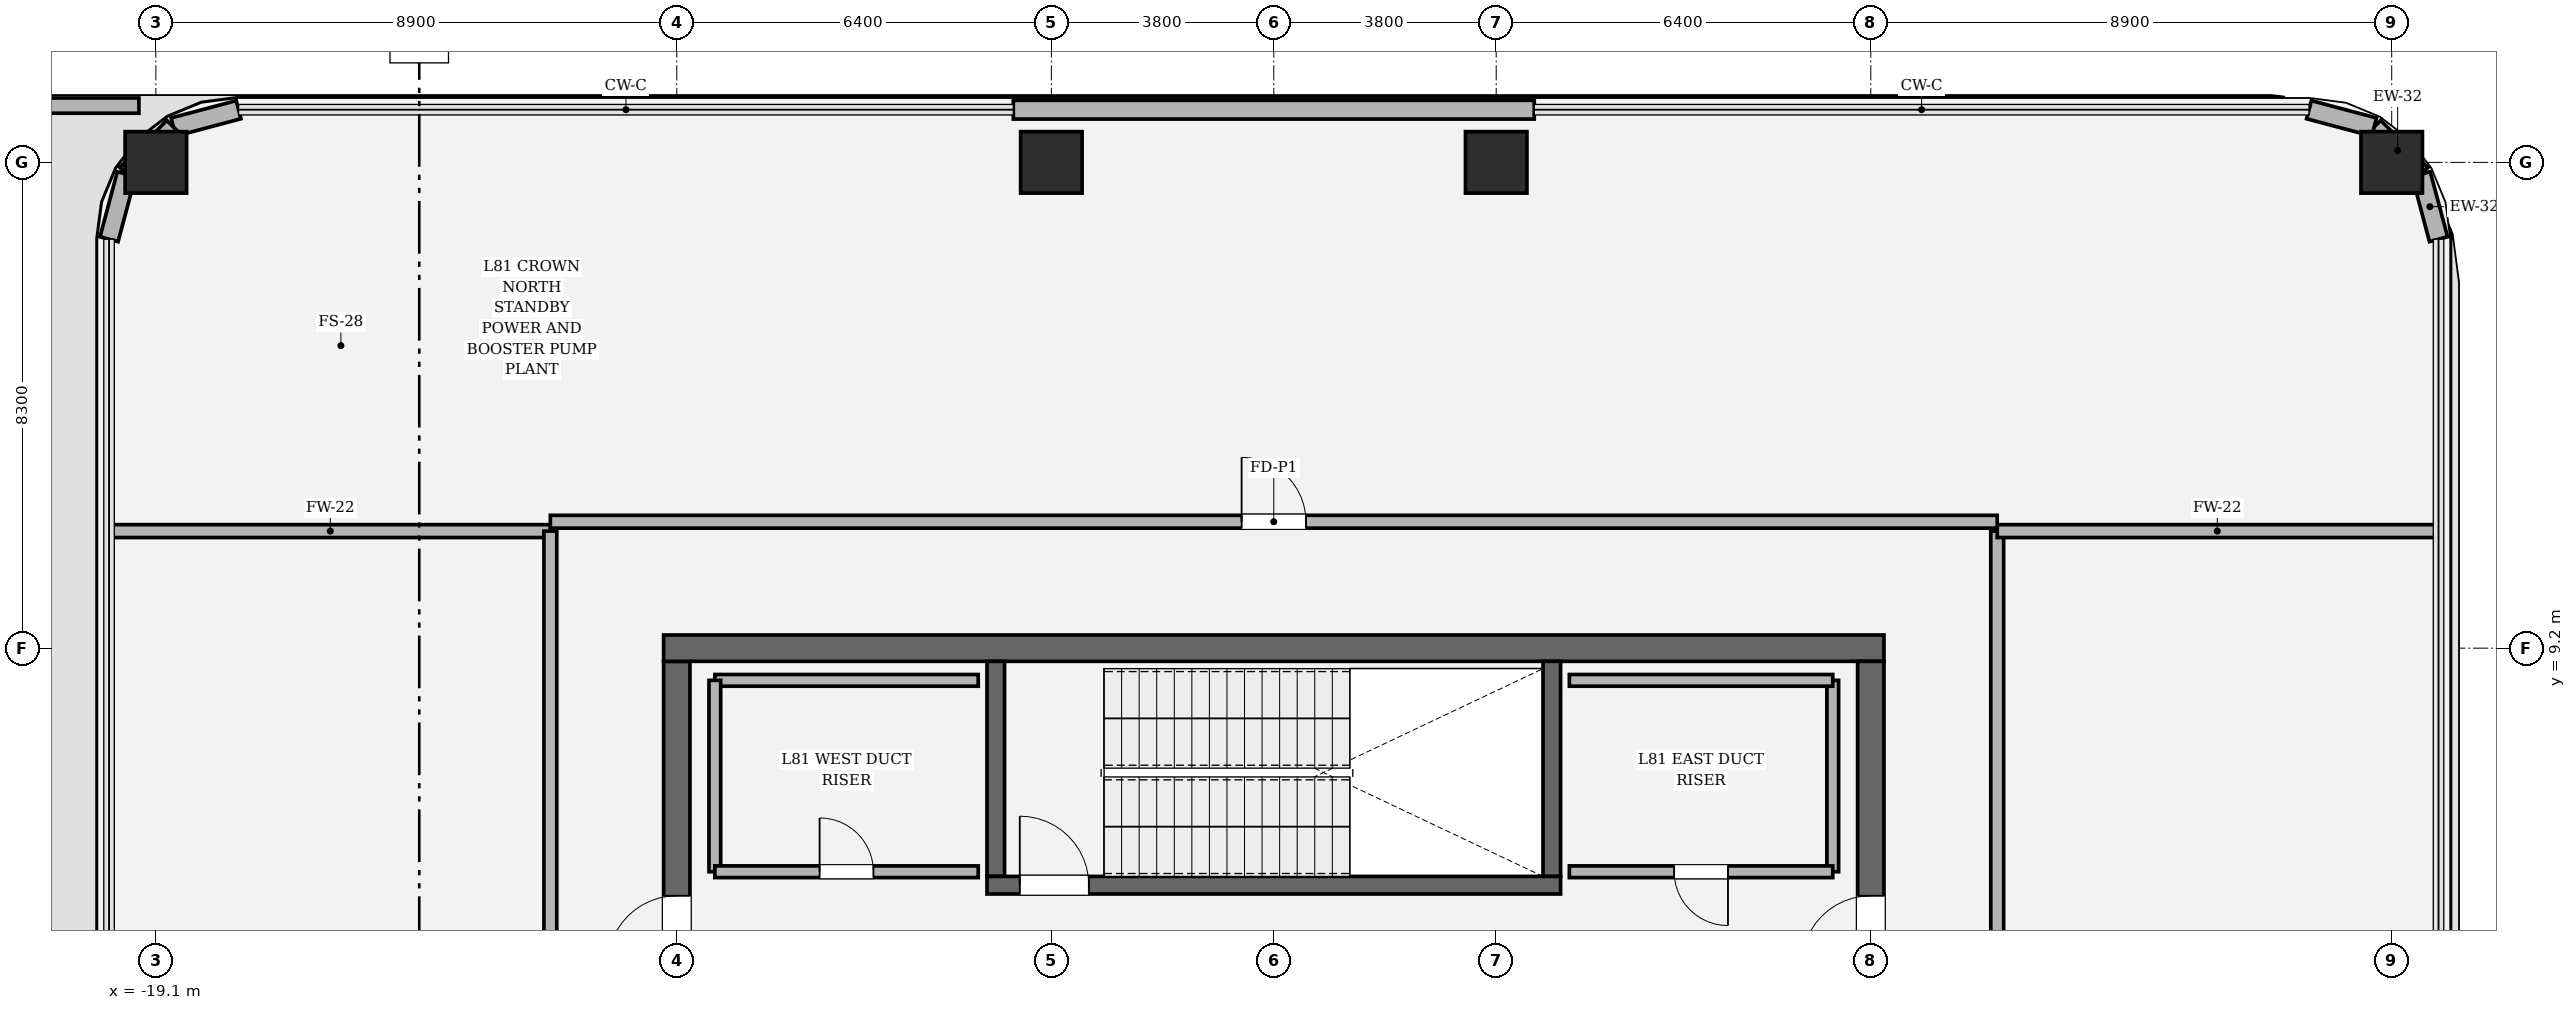
"""IFC4 building model, lengths in metres.
Left out: names, types, materials, properties, quantities, classifications, styles, units other than length and angle.
Written with IfcOpenShell. Run it as: python <this file> out.ifc"""

import sys

from ifc_helpers import new_model, si_unit, direction, frame, frame_2d, origin, origin_2d, place, context, subcontext, project, spatial, rectangle, hollow_rectangle, extrude, element, fill, save


model = new_model("IFC4")
c1 = context("Model", 3, precision=1e-05, world=origin(), true_north=direction((0.0, 1.0)))
c2 = subcontext(c1, "Body", "Model", "MODEL_VIEW")
j1 = project(units=[si_unit("LENGTHUNIT", "METRE"), si_unit("PLANEANGLEUNIT", "RADIAN")], contexts=[c1])
p1 = place(None, origin())
s1 = spatial("IfcSite", under=j1, at=p1, CompositionType="ELEMENT")
p2 = place(p1, origin())
s2 = spatial("IfcBuilding", under=s1, at=p2, CompositionType="ELEMENT")
p3 = place(p2, frame((0.0, 0.0, 343.8)))
s3 = spatial("IfcBuildingStorey", under=s2, at=p3, CompositionType="ELEMENT", Elevation=343.8)
p4 = place(p3, frame((-10.2, -8.975, 0.0), z_axis=(0.0, 0.0, 1.0), x_axis=(0.0, 1.0, 0.0)))
e1 = element("IfcWall", 1, at=p4, inside=s3, PredefinedType="SHEAR", context=c2, shape_type="SweptSolid", body=[
    extrude(rectangle(XDim=17.95, YDim=0.45, at=frame_2d((8.975, 0.0))), origin(), (0.0, 0.0, 1.0), 4.5),
])
p5 = place(p4, frame((12.765, 0.0, 0.0)))
e2 = element("IfcOpeningElement", 2, at=p5, cuts=e1, PredefinedType="OPENING", context=c2, shape_type="SweptSolid", body=[
    extrude(rectangle(XDim=1.18, YDim=2.2, at=frame_2d((0.59, 1.1))), frame((0.0, 0.235, 0.0), z_axis=(0.0, -1.0, 0.0), x_axis=(1.0, 0.0, 0.0)), (0.0, 0.0, 1.0), 0.47),
])
p6 = place(p3, frame((-10.425, 9.2, 0.0), z_axis=(0.0, 0.0, 1.0), x_axis=(1.0, 0.0, 0.0)))
e3 = element("IfcWall", 3, at=p6, inside=s3, PredefinedType="SHEAR", context=c2, shape_type="SweptSolid", body=[
    extrude(rectangle(XDim=20.85, YDim=0.45, at=frame_2d((10.425, 0.0))), origin(), (0.0, 0.0, 1.0), 4.5),
])
p7 = place(p3, frame((10.2, 8.975, 0.0), z_axis=(0.0, 0.0, 1.0), x_axis=(0.0, -1.0, 0.0)))
e4 = element("IfcWall", 4, at=p7, inside=s3, PredefinedType="SHEAR", context=c2, shape_type="SweptSolid", body=[
    extrude(rectangle(XDim=17.95, YDim=0.45, at=frame_2d((8.975, 0.0))), origin(), (0.0, 0.0, 1.0), 4.5),
])
p8 = place(p7, frame((4.005, 0.0, 0.0)))
e5 = element("IfcOpeningElement", 5, at=p8, cuts=e4, PredefinedType="OPENING", context=c2, shape_type="SweptSolid", body=[
    extrude(rectangle(XDim=1.18, YDim=2.2, at=frame_2d((0.59, 1.1))), frame((0.0, 0.235, 0.0), z_axis=(0.0, -1.0, 0.0), x_axis=(1.0, 0.0, 0.0)), (0.0, 0.0, 1.0), 0.47),
])
for number, where, z_axis, x_axis in (
    (6, (-4.75, 5.3, 0.0), (0.0, 0.0, 1.0), (0.0, 1.0, 0.0)),
    (7, (4.75, 8.975, 0.0), (0.0, 0.0, 1.0), (0.0, -1.0, 0.0)),
):
    element("IfcWall", number, at=place(p3, frame(where, z_axis=z_axis, x_axis=x_axis)), inside=s3, PredefinedType="SOLIDWALL", context=c2, shape_type="SweptSolid", body=[
        extrude(rectangle(XDim=3.675, YDim=0.3, at=frame_2d((1.837, 0.0))), origin(), (0.0, 0.0, 1.0), 4.5),
    ])
p9 = place(p3, frame((-4.9, 5.15, 0.0), z_axis=(0.0, 0.0, 1.0), x_axis=(1.0, 0.0, 0.0)))
e8 = element("IfcWall", 8, at=p9, inside=s3, PredefinedType="SOLIDWALL", context=c2, shape_type="SweptSolid", body=[
    extrude(rectangle(XDim=9.8, YDim=0.3, at=frame_2d((4.9, 0.0))), origin(), (0.0, 0.0, 1.0), 4.5),
])
p10 = place(p9, frame((0.56, 0.0, 0.0)))
e9 = element("IfcOpeningElement", 9, at=p10, cuts=e8, PredefinedType="OPENING", context=c2, shape_type="SweptSolid", body=[
    extrude(rectangle(XDim=1.18, YDim=2.2, at=frame_2d((0.59, 1.1))), frame((0.0, 0.16, 0.0), z_axis=(0.0, -1.0, 0.0), x_axis=(1.0, 0.0, 0.0)), (0.0, 0.0, 1.0), 0.32),
])
for number, where, z_axis, x_axis in (
    (10, (19.1, 17.5, 0.0), (0.0, 0.0, 1.0), (1.0, 0.0, 0.0)),
    (11, (3.8, 17.5, 0.0), (0.0, 0.0, 1.0), (1.0, 0.0, 0.0)),
    (12, (-3.8, 17.5, 0.0), (0.0, 0.0, 1.0), (1.0, 0.0, 0.0)),
    (13, (-19.1, 17.5, 0.0), (0.0, 0.0, 1.0), (1.0, 0.0, 0.0)),
):
    element("IfcColumn", number, at=place(p3, frame(where, z_axis=z_axis, x_axis=x_axis)), inside=s3, PredefinedType="COLUMN", context=c2, shape_type="SweptSolid", body=[
        extrude(hollow_rectangle(XDim=1.05, YDim=1.05, WallThickness=0.03, at=origin_2d()), origin(), (0.0, 0.0, 1.0), 4.5),
    ])
p11 = place(p3, frame((19.9, 16.187, 0.0), z_axis=(0.0, 0.0, 1.0), x_axis=(-0.257332533551, 0.966322910406, 0.0)))
e14 = element("IfcWall", 14, at=p11, inside=s3, PredefinedType="SOLIDWALL", context=c2, shape_type="SweptSolid", body=[
    extrude(rectangle(XDim=1.151, YDim=0.32, at=frame_2d((0.575, 0.0))), origin(), (0.0, 0.0, 1.0), 4.28),
])
p12 = place(p3, frame((19.604, 17.299, 0.0), z_axis=(0.0, 0.0, 1.0), x_axis=(-0.707106781187, 0.707106781187, 0.0)))
e15 = element("IfcWall", 15, at=p12, inside=s3, PredefinedType="SOLIDWALL", context=c2, shape_type="SweptSolid", body=[
    extrude(rectangle(XDim=1.138, YDim=0.32, at=frame_2d((0.569, 0.0))), origin(), (0.0, 0.0, 1.0), 2.954),
])
p13 = place(p3, frame((18.799, 18.104, 0.0), z_axis=(0.0, 0.0, 1.0), x_axis=(-0.966322910406, 0.257332533551, 0.0)))
e16 = element("IfcWall", 16, at=p13, inside=s3, PredefinedType="SOLIDWALL", context=c2, shape_type="SweptSolid", body=[
    extrude(rectangle(XDim=1.151, YDim=0.32, at=frame_2d((0.575, 0.0))), origin(), (0.0, 0.0, 1.0), 4.28),
])
p14 = place(p3, frame((4.45, 18.4, 0.0), z_axis=(0.0, 0.0, 1.0), x_axis=(-1.0, 0.0, 0.0)))
e17 = element("IfcWall", 17, at=p14, inside=s3, PredefinedType="SOLIDWALL", context=c2, shape_type="SweptSolid", body=[
    extrude(rectangle(XDim=8.9, YDim=0.32, at=frame_2d((4.45, 0.0))), origin(), (0.0, 0.0, 1.0), 4.28),
])
p15 = place(p3, frame((-17.687, 18.4, 0.0), z_axis=(0.0, 0.0, 1.0), x_axis=(-0.966322910406, -0.257332533551, 0.0)))
e18 = element("IfcWall", 18, at=p15, inside=s3, PredefinedType="SOLIDWALL", context=c2, shape_type="SweptSolid", body=[
    extrude(rectangle(XDim=1.151, YDim=0.32, at=frame_2d((0.575, 0.0))), origin(), (0.0, 0.0, 1.0), 4.28),
])
p16 = place(p3, frame((-18.799, 18.104, 0.0), z_axis=(0.0, 0.0, 1.0), x_axis=(-0.707106781187, -0.707106781187, 0.0)))
e19 = element("IfcWall", 19, at=p16, inside=s3, PredefinedType="SOLIDWALL", context=c2, shape_type="SweptSolid", body=[
    extrude(rectangle(XDim=1.138, YDim=0.32, at=frame_2d((0.569, 0.0))), origin(), (0.0, 0.0, 1.0), 2.954),
])
p17 = place(p3, frame((-19.604, 17.299, 0.0), z_axis=(0.0, 0.0, 1.0), x_axis=(-0.257332533551, -0.966322910406, 0.0)))
e20 = element("IfcWall", 20, at=p17, inside=s3, PredefinedType="SOLIDWALL", context=c2, shape_type="SweptSolid", body=[
    extrude(rectangle(XDim=1.151, YDim=0.32, at=frame_2d((0.575, 0.0))), origin(), (0.0, 0.0, 1.0), 4.28),
])
p18 = place(p3, frame((-19.39, 18.47, 0.0), z_axis=(0.0, 0.0, 1.0), x_axis=(-1.0, 0.0, 0.0)))
e21 = element("IfcWall", 21, at=p18, inside=s3, PredefinedType="PARAPET", context=c2, shape_type="SweptSolid", body=[
    extrude(rectangle(XDim=2.448, YDim=0.26, at=frame_2d((1.224, 0.0))), origin(), (0.0, 0.0, 1.0), 1.2),
])
p19 = place(p3, frame((-5.05, 8.65, 0.0), z_axis=(0.0, 0.0, 1.0), x_axis=(-1.0, 0.0, 0.0)))
e22 = element("IfcWall", 22, at=p19, inside=s3, PredefinedType="SOLIDWALL", context=c2, shape_type="SweptSolid", body=[
    extrude(rectangle(XDim=4.5, YDim=0.2, at=frame_2d((2.25, 0.0))), origin(), (0.0, 0.0, 1.0), 4.28),
])
p20 = place(p3, frame((-9.55, 8.65, 0.0), z_axis=(0.0, 0.0, 1.0), x_axis=(0.0, -1.0, 0.0)))
e23 = element("IfcWall", 23, at=p20, inside=s3, PredefinedType="SOLIDWALL", context=c2, shape_type="SweptSolid", body=[
    extrude(rectangle(XDim=3.27, YDim=0.2, at=frame_2d((1.635, 0.0))), origin(), (0.0, 0.0, 1.0), 4.28),
])
p21 = place(p3, frame((-9.55, 5.38, 0.0), z_axis=(0.0, 0.0, 1.0), x_axis=(1.0, 0.0, 0.0)))
e24 = element("IfcWall", 24, at=p21, inside=s3, PredefinedType="SOLIDWALL", context=c2, shape_type="SweptSolid", body=[
    extrude(rectangle(XDim=4.5, YDim=0.2, at=frame_2d((2.25, 0.0))), origin(), (0.0, 0.0, 1.0), 4.28),
])
p22 = place(p21, frame((1.79, 0.0, 0.0)))
e25 = element("IfcOpeningElement", 25, at=p22, cuts=e24, PredefinedType="OPENING", context=c2, shape_type="SweptSolid", body=[
    extrude(rectangle(XDim=0.92, YDim=2.1, at=frame_2d((0.46, 1.05))), frame((0.0, 0.11, 0.0), z_axis=(0.0, -1.0, 0.0), x_axis=(1.0, 0.0, 0.0)), (0.0, 0.0, 1.0), 0.22),
])
p23 = place(p3, frame((9.55, 5.38, 0.0), z_axis=(0.0, 0.0, 1.0), x_axis=(0.0, 1.0, 0.0)))
e26 = element("IfcWall", 26, at=p23, inside=s3, PredefinedType="SOLIDWALL", context=c2, shape_type="SweptSolid", body=[
    extrude(rectangle(XDim=3.27, YDim=0.2, at=frame_2d((1.635, 0.0))), origin(), (0.0, 0.0, 1.0), 4.28),
])
p24 = place(p3, frame((9.55, 8.65, 0.0), z_axis=(0.0, 0.0, 1.0), x_axis=(-1.0, 0.0, 0.0)))
e27 = element("IfcWall", 27, at=p24, inside=s3, PredefinedType="SOLIDWALL", context=c2, shape_type="SweptSolid", body=[
    extrude(rectangle(XDim=4.5, YDim=0.2, at=frame_2d((2.25, 0.0))), origin(), (0.0, 0.0, 1.0), 4.28),
])
p25 = place(p3, frame((5.05, 5.38, 0.0), z_axis=(0.0, 0.0, 1.0), x_axis=(1.0, 0.0, 0.0)))
e28 = element("IfcWall", 28, at=p25, inside=s3, PredefinedType="SOLIDWALL", context=c2, shape_type="SweptSolid", body=[
    extrude(rectangle(XDim=4.5, YDim=0.2, at=frame_2d((2.25, 0.0))), origin(), (0.0, 0.0, 1.0), 4.28),
])
p26 = place(p25, frame((1.79, 0.0, 0.0)))
e29 = element("IfcOpeningElement", 29, at=p26, cuts=e28, PredefinedType="OPENING", context=c2, shape_type="SweptSolid", body=[
    extrude(rectangle(XDim=0.92, YDim=2.1, at=frame_2d((0.46, 1.05))), frame((0.0, 0.11, 0.0), z_axis=(0.0, -1.0, 0.0), x_axis=(1.0, 0.0, 0.0)), (0.0, 0.0, 1.0), 0.22),
])
p27 = place(p3, frame((-19.88, 11.2, 0.0), z_axis=(0.0, 0.0, 1.0), x_axis=(1.0, 0.0, 0.0)))
e30 = element("IfcWall", 30, at=p27, inside=s3, PredefinedType="SOLIDWALL", context=c2, shape_type="SweptSolid", body=[
    extrude(rectangle(XDim=7.52, YDim=0.22, at=frame_2d((3.76, 0.0))), origin(), (0.0, 0.0, 1.0), 2.954),
])
p28 = place(p3, frame((-12.36, 11.2, 0.0), z_axis=(0.0, 0.0, 1.0), x_axis=(0.0, -1.0, 0.0)))
e31 = element("IfcWall", 31, at=p28, inside=s3, PredefinedType="SOLIDWALL", context=c2, shape_type="SweptSolid", body=[
    extrude(rectangle(XDim=22.4, YDim=0.22, at=frame_2d((11.2, 0.0))), origin(), (0.0, 0.0, 1.0), 2.954),
])
p29 = place(p28, frame((10.65, 0.0, 0.0)))
e32 = element("IfcOpeningElement", 32, at=p29, cuts=e31, PredefinedType="OPENING", context=c2, shape_type="SweptSolid", body=[
    extrude(rectangle(XDim=1.1, YDim=2.2, at=frame_2d((0.55, 1.1))), frame((0.0, 0.12, 0.0), z_axis=(0.0, -1.0, 0.0), x_axis=(1.0, 0.0, 0.0)), (0.0, 0.0, 1.0), 0.24),
])
p30 = place(p3, frame((12.36, -11.2, 0.0), z_axis=(0.0, 0.0, 1.0), x_axis=(0.0, 1.0, 0.0)))
e33 = element("IfcWall", 33, at=p30, inside=s3, PredefinedType="SOLIDWALL", context=c2, shape_type="SweptSolid", body=[
    extrude(rectangle(XDim=22.4, YDim=0.22, at=frame_2d((11.2, 0.0))), origin(), (0.0, 0.0, 1.0), 2.954),
])
p31 = place(p30, frame((10.65, 0.0, 0.0)))
e34 = element("IfcOpeningElement", 34, at=p31, cuts=e33, PredefinedType="OPENING", context=c2, shape_type="SweptSolid", body=[
    extrude(rectangle(XDim=1.1, YDim=2.2, at=frame_2d((0.55, 1.1))), frame((0.0, 0.12, 0.0), z_axis=(0.0, -1.0, 0.0), x_axis=(1.0, 0.0, 0.0)), (0.0, 0.0, 1.0), 0.24),
])
p32 = place(p3, frame((12.36, 11.2, 0.0), z_axis=(0.0, 0.0, 1.0), x_axis=(1.0, 0.0, 0.0)))
e35 = element("IfcWall", 35, at=p32, inside=s3, PredefinedType="SOLIDWALL", context=c2, shape_type="SweptSolid", body=[
    extrude(rectangle(XDim=7.52, YDim=0.22, at=frame_2d((3.76, 0.0))), origin(), (0.0, 0.0, 1.0), 2.954),
])
p33 = place(p3, frame((12.36, 11.36, 0.0), z_axis=(0.0, 0.0, 1.0), x_axis=(-1.0, 0.0, 0.0)))
e36 = element("IfcWall", 36, at=p33, inside=s3, PredefinedType="SOLIDWALL", context=c2, shape_type="SweptSolid", body=[
    extrude(rectangle(XDim=24.72, YDim=0.22, at=frame_2d((12.36, 0.0))), origin(), (0.0, 0.0, 1.0), 2.954),
])
p34 = place(p33, frame((11.81, 0.0, 0.0)))
e37 = element("IfcOpeningElement", 37, at=p34, cuts=e36, PredefinedType="OPENING", context=c2, shape_type="SweptSolid", body=[
    extrude(rectangle(XDim=1.1, YDim=2.2, at=frame_2d((0.55, 1.1))), frame((0.0, 0.12, 0.0), z_axis=(0.0, -1.0, 0.0), x_axis=(1.0, 0.0, 0.0)), (0.0, 0.0, 1.0), 0.24),
])
p35 = place(p10, origin())
e38 = element("IfcDoor", 38, at=p35, inside=s3, OperationType="SINGLE_SWING_LEFT", PredefinedType="DOOR", context=c2, shape_type="SweptSolid", body=[
    extrude(rectangle(XDim=1.18, YDim=2.2, at=frame_2d((0.59, 1.1))), frame((0.0, 0.025, 0.0), z_axis=(0.0, -1.0, 0.0), x_axis=(1.0, 0.0, 0.0)), (0.0, 0.0, 1.0), 0.05),
])
fill(e9, e38)
p36 = place(p5, origin())
e39 = element("IfcDoor", 39, at=p36, inside=s3, OperationType="SINGLE_SWING_LEFT", PredefinedType="DOOR", context=c2, shape_type="SweptSolid", body=[
    extrude(rectangle(XDim=1.18, YDim=2.2, at=frame_2d((0.59, 1.1))), frame((0.0, 0.025, 0.0), z_axis=(0.0, -1.0, 0.0), x_axis=(1.0, 0.0, 0.0)), (0.0, 0.0, 1.0), 0.05),
])
fill(e2, e39)
p37 = place(p8, origin())
e40 = element("IfcDoor", 40, at=p37, inside=s3, OperationType="SINGLE_SWING_RIGHT", PredefinedType="DOOR", context=c2, shape_type="SweptSolid", body=[
    extrude(rectangle(XDim=1.18, YDim=2.2, at=frame_2d((0.59, 1.1))), frame((0.0, 0.025, 0.0), z_axis=(0.0, -1.0, 0.0), x_axis=(1.0, 0.0, 0.0)), (0.0, 0.0, 1.0), 0.05),
])
fill(e5, e40)
p38 = place(p22, origin())
e41 = element("IfcDoor", 41, at=p38, inside=s3, OperationType="SINGLE_SWING_LEFT", PredefinedType="DOOR", context=c2, shape_type="SweptSolid", body=[
    extrude(rectangle(XDim=0.92, YDim=2.1, at=frame_2d((0.46, 1.05))), frame((0.0, 0.025, 0.0), z_axis=(0.0, -1.0, 0.0), x_axis=(1.0, 0.0, 0.0)), (0.0, 0.0, 1.0), 0.05),
])
fill(e25, e41)
p39 = place(p26, origin())
e42 = element("IfcDoor", 42, at=p39, inside=s3, OperationType="SINGLE_SWING_RIGHT", PredefinedType="DOOR", context=c2, shape_type="SweptSolid", body=[
    extrude(rectangle(XDim=0.92, YDim=2.1, at=frame_2d((0.46, 1.05))), frame((0.0, 0.025, 0.0), z_axis=(0.0, -1.0, 0.0), x_axis=(1.0, 0.0, 0.0)), (0.0, 0.0, 1.0), 0.05),
])
fill(e29, e42)
p40 = place(p34, origin())
e43 = element("IfcDoor", 43, at=p40, inside=s3, OperationType="SINGLE_SWING_RIGHT", PredefinedType="DOOR", context=c2, shape_type="SweptSolid", body=[
    extrude(rectangle(XDim=1.1, YDim=2.2, at=frame_2d((0.55, 1.1))), frame((0.0, 0.025, 0.0), z_axis=(0.0, -1.0, 0.0), x_axis=(1.0, 0.0, 0.0)), (0.0, 0.0, 1.0), 0.05),
])
fill(e37, e43)
save(model, sys.argv[1])
